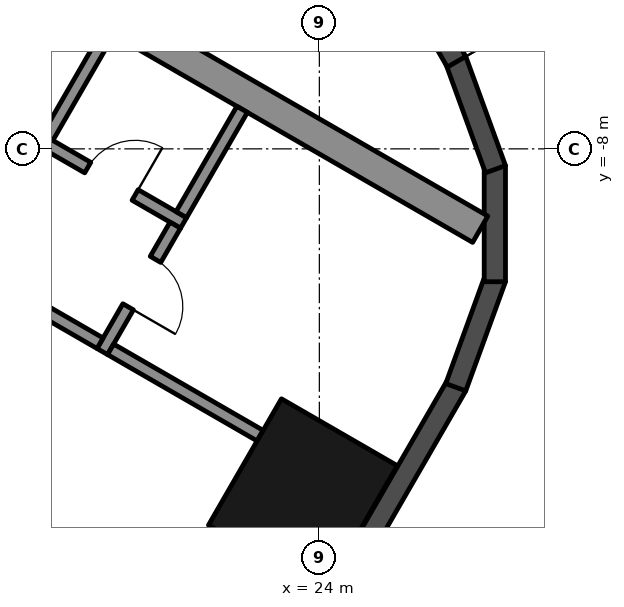
"""IFC4 building model, lengths in metres.
Left out: names, types, materials, properties, quantities, classifications, styles, units other than length and angle.
Written with IfcOpenShell. Run it as: python <this file> out.ifc"""

import sys

from ifc_helpers import new_model, si_unit, direction, frame, frame_2d, origin, origin_2d, place, context, subcontext, project, spatial, rectangle, hollow_rectangle, extrude, element, fill, save


model = new_model("IFC4")
c1 = context("Model", 3, precision=1e-05, world=origin(), true_north=direction((0.0, 1.0)))
c2 = subcontext(c1, "Body", "Model", "MODEL_VIEW")
j1 = project(units=[si_unit("LENGTHUNIT", "METRE"), si_unit("PLANEANGLEUNIT", "RADIAN")], contexts=[c1])
p1 = place(None, origin())
s1 = spatial("IfcSite", under=j1, at=p1, CompositionType="ELEMENT")
p2 = place(p1, origin())
s2 = spatial("IfcBuilding", under=s1, at=p2, CompositionType="ELEMENT")
p3 = place(p2, frame((0.0, 0.0, 154.0)))
s3 = spatial("IfcBuildingStorey", under=s2, at=p3, CompositionType="ELEMENT", Elevation=154.0)
p4 = place(p3, frame((23.729, -13.7, 0.0), z_axis=(0.0, 0.0, 1.0), x_axis=(0.5, 0.866025403784, 0.0)))
e1 = element("IfcColumn", 1, at=p4, inside=s3, PredefinedType="COLUMN", context=c2, shape_type="SweptSolid", body=[
    extrude(hollow_rectangle(XDim=2.4, YDim=2.2, WallThickness=0.06, at=origin_2d()), origin(), (0.0, 0.0, 1.0), 3.7),
])
p5 = place(p3, frame((23.427, -16.792, 0.0), z_axis=(0.0, 0.0, 1.0), x_axis=(0.500018773155, 0.866014564827, 0.0)))
e2 = element("IfcWall", 2, at=p5, inside=s3, PredefinedType="SOLIDWALL", context=c2, shape_type="SweptSolid", body=[
    extrude(rectangle(XDim=5.658, YDim=0.35, at=frame_2d((2.829, 0.0))), origin(), (0.0, 0.0, 1.0), 3.55),
])
for number, where, z_axis, x_axis in (
    (3, (26.244, -11.92, 0.0), (0.0, 0.0, 1.0), (0.342, 0.94, 0.0)),
    (4, (26.886, -10.185, 0.0), (0.0, 0.0, 1.0), (0.0, 1.0, 0.0)),
    (5, (26.897, -8.335, 0.0), (0.0, 0.0, 1.0), (-0.342, 0.94, 0.0)),
):
    element("IfcWall", number, at=place(p3, frame(where, z_axis=z_axis, x_axis=x_axis)), inside=s3, PredefinedType="SOLIDWALL", context=c2, shape_type="SweptSolid", body=[
        extrude(rectangle(XDim=1.91, YDim=0.35, at=frame_2d((0.955, 0.0))), origin(), (0.0, 0.0, 1.0), 3.55),
    ])
p6 = place(p3, frame((26.257, -6.567, 0.0), z_axis=(0.0, 0.0, 1.0), x_axis=(-0.500023526245, 0.866011820475, 0.0)))
e6 = element("IfcWall", 6, at=p6, inside=s3, PredefinedType="SOLIDWALL", context=c2, shape_type="SweptSolid", body=[
    extrude(rectangle(XDim=11.816, YDim=0.35, at=frame_2d((5.908, 0.0))), origin(), (0.0, 0.0, 1.0), 3.55),
])
p7 = place(p6, frame((0.38, 0.0, 0.3)))
e7 = element("IfcOpeningElement", 7, at=p7, cuts=e6, PredefinedType="OPENING", context=c2, shape_type="SweptSolid", body=[
    extrude(rectangle(XDim=1.8, YDim=2.65, at=frame_2d((0.9, 1.325))), frame((0.0, 0.185, 0.0), z_axis=(0.0, -1.0, 0.0), x_axis=(1.0, 0.0, 0.0)), (0.0, 0.0, 1.0), 0.37),
])
p8 = place(p6, frame((7.741, 0.0, 0.0)))
e8 = element("IfcOpeningElement", 8, at=p8, cuts=e6, PredefinedType="OPENING", context=c2, shape_type="SweptSolid", body=[
    extrude(rectangle(XDim=2.4, YDim=2.4, at=frame_2d((1.2, 1.2))), frame((0.0, 0.185, 0.0), z_axis=(0.0, -1.0, 0.0), x_axis=(1.0, 0.0, 0.0)), (0.0, 0.0, 1.0), 0.37),
])
p9 = place(p6, frame((3.791, 0.0, 0.3)))
e9 = element("IfcOpeningElement", 9, at=p9, cuts=e6, PredefinedType="OPENING", context=c2, shape_type="SweptSolid", body=[
    extrude(rectangle(XDim=1.6, YDim=2.65, at=frame_2d((0.8, 1.325))), frame((0.0, 0.185, 0.0), z_axis=(0.0, -1.0, 0.0), x_axis=(1.0, 0.0, 0.0)), (0.0, 0.0, 1.0), 0.37),
])
p10 = place(p6, frame((5.691, 0.0, 0.3)))
e10 = element("IfcOpeningElement", 10, at=p10, cuts=e6, PredefinedType="OPENING", context=c2, shape_type="SweptSolid", body=[
    extrude(rectangle(XDim=1.6, YDim=2.65, at=frame_2d((0.8, 1.325))), frame((0.0, 0.185, 0.0), z_axis=(0.0, -1.0, 0.0), x_axis=(1.0, 0.0, 0.0)), (0.0, 0.0, 1.0), 0.37),
])
for number, where, z_axis, x_axis in (
    (11, (8.547, -10.997, 0.0), (0.0, 0.0, 1.0), (0.866, -0.5, 0.0)),
    (12, (13.797, -1.903, 0.0), (0.0, 0.0, 1.0), (0.866, -0.5, 0.0)),
):
    element("IfcWall", number, at=place(p3, frame(where, z_axis=z_axis, x_axis=x_axis)), inside=s3, PredefinedType="SHEAR", context=c2, shape_type="SweptSolid", body=[
        extrude(rectangle(XDim=14.837, YDim=0.5, at=frame_2d((7.418, 0.0))), origin(), (0.0, 0.0, 1.0), 3.5),
    ])
p11 = place(p3, frame((12.968, -4.138, 0.0), z_axis=(0.0, 0.0, 1.0), x_axis=(0.866028328073, -0.49999493495, 0.0)))
e13 = element("IfcWall", 13, at=p11, inside=s3, PredefinedType="SHEAR", context=c2, shape_type="SweptSolid", body=[
    extrude(rectangle(XDim=10.16, YDim=0.2, at=frame_2d((5.08, 0.0))), origin(), (0.0, 0.0, 1.0), 3.5),
])
p12 = place(p11, frame((3.26, 0.0, 0.0)))
e14 = element("IfcOpeningElement", 14, at=p12, cuts=e13, PredefinedType="OPENING", context=c2, shape_type="SweptSolid", body=[
    extrude(rectangle(XDim=0.9, YDim=2.1, at=frame_2d((0.45, 1.05))), frame((0.0, 0.11, 0.0), z_axis=(0.0, -1.0, 0.0), x_axis=(1.0, 0.0, 0.0)), (0.0, 0.0, 1.0), 0.22),
])
p13 = place(p11, frame((8.34, 0.0, 0.0)))
e15 = element("IfcOpeningElement", 15, at=p13, cuts=e13, PredefinedType="OPENING", context=c2, shape_type="SweptSolid", body=[
    extrude(rectangle(XDim=0.9, YDim=2.1, at=frame_2d((0.45, 1.05))), frame((0.0, 0.11, 0.0), z_axis=(0.0, -1.0, 0.0), x_axis=(1.0, 0.0, 0.0)), (0.0, 0.0, 1.0), 0.22),
])
p14 = place(p3, frame((20.43, -11.333, 0.0), z_axis=(0.0, 0.0, 1.0), x_axis=(0.500001309137, 0.866024647952, 0.0)))
e16 = element("IfcWall", 16, at=p14, inside=s3, PredefinedType="SHEAR", context=c2, shape_type="SweptSolid", body=[
    extrude(rectangle(XDim=2.4, YDim=0.2, at=frame_2d((1.2, 0.0))), origin(), (0.0, 0.0, 1.0), 3.5),
])
p15 = place(p14, frame((0.85, 0.0, 0.0)))
e17 = element("IfcOpeningElement", 17, at=p15, cuts=e16, PredefinedType="OPENING", context=c2, shape_type="SweptSolid", body=[
    extrude(rectangle(XDim=0.9, YDim=2.1, at=frame_2d((0.45, 1.05))), frame((0.0, 0.11, 0.0), z_axis=(0.0, -1.0, 0.0), x_axis=(1.0, 0.0, 0.0)), (0.0, 0.0, 1.0), 0.22),
])
p16 = place(p3, frame((18.913, -10.342, 0.0), z_axis=(0.0, 0.0, 1.0), x_axis=(0.866038183914, -0.499977863513, 0.0)))
e18 = element("IfcWall", 18, at=p16, inside=s3, PredefinedType="SHEAR", context=c2, shape_type="SweptSolid", body=[
    extrude(rectangle(XDim=1.71, YDim=0.2, at=frame_2d((0.855, 0.0))), origin(), (0.0, 0.0, 1.0), 3.5),
])
for number, where, z_axis, x_axis in (
    (19, (19.531, -7.812, 0.0), (0.0, 0.0, 1.0), (0.5, 0.866, 0.0)),
    (20, (21.73, -9.082, 0.0), (0.0, 0.0, 1.0), (0.5, 0.866, 0.0)),
):
    element("IfcWall", number, at=place(p3, frame(where, z_axis=z_axis, x_axis=x_axis)), inside=s3, PredefinedType="SHEAR", context=c2, shape_type="SweptSolid", body=[
        extrude(rectangle(XDim=2.0, YDim=0.2, at=frame_2d((1.0, 0.0))), origin(), (0.0, 0.0, 1.0), 3.5),
    ])
p17 = place(p3, frame((20.567, -11.297, 0.0), z_axis=(0.0, 0.0, 1.0), x_axis=(0.866055327414, -0.49994816717, 0.0)))
e21 = element("IfcWall", 21, at=p17, inside=s3, PredefinedType="SHEAR", context=c2, shape_type="SweptSolid", body=[
    extrude(rectangle(XDim=2.84, YDim=0.2, at=frame_2d((1.42, 0.0))), origin(), (0.0, 0.0, 1.0), 3.5),
])
p18 = place(p13, origin())
e22 = element("IfcDoor", 22, at=p18, inside=s3, OperationType="SINGLE_SWING_RIGHT", PredefinedType="DOOR", context=c2, shape_type="SweptSolid", body=[
    extrude(rectangle(XDim=0.9, YDim=2.1, at=frame_2d((0.45, 1.05))), frame((0.0, 0.025, 0.0), z_axis=(0.0, -1.0, 0.0), x_axis=(1.0, 0.0, 0.0)), (0.0, 0.0, 1.0), 0.05),
])
fill(e15, e22)
p19 = place(p15, frame((0.9, 0.0, 0.0), z_axis=(0.0, 0.0, 1.0), x_axis=(-1.0, 0.0, 0.0)))
e23 = element("IfcDoor", 23, at=p19, inside=s3, OperationType="SINGLE_SWING_RIGHT", PredefinedType="DOOR", context=c2, shape_type="SweptSolid", body=[
    extrude(rectangle(XDim=0.9, YDim=2.1, at=frame_2d((0.45, 1.05))), frame((0.0, 0.025, 0.0), z_axis=(0.0, -1.0, 0.0), x_axis=(1.0, 0.0, 0.0)), (0.0, 0.0, 1.0), 0.05),
])
fill(e17, e23)
save(model, sys.argv[1])
